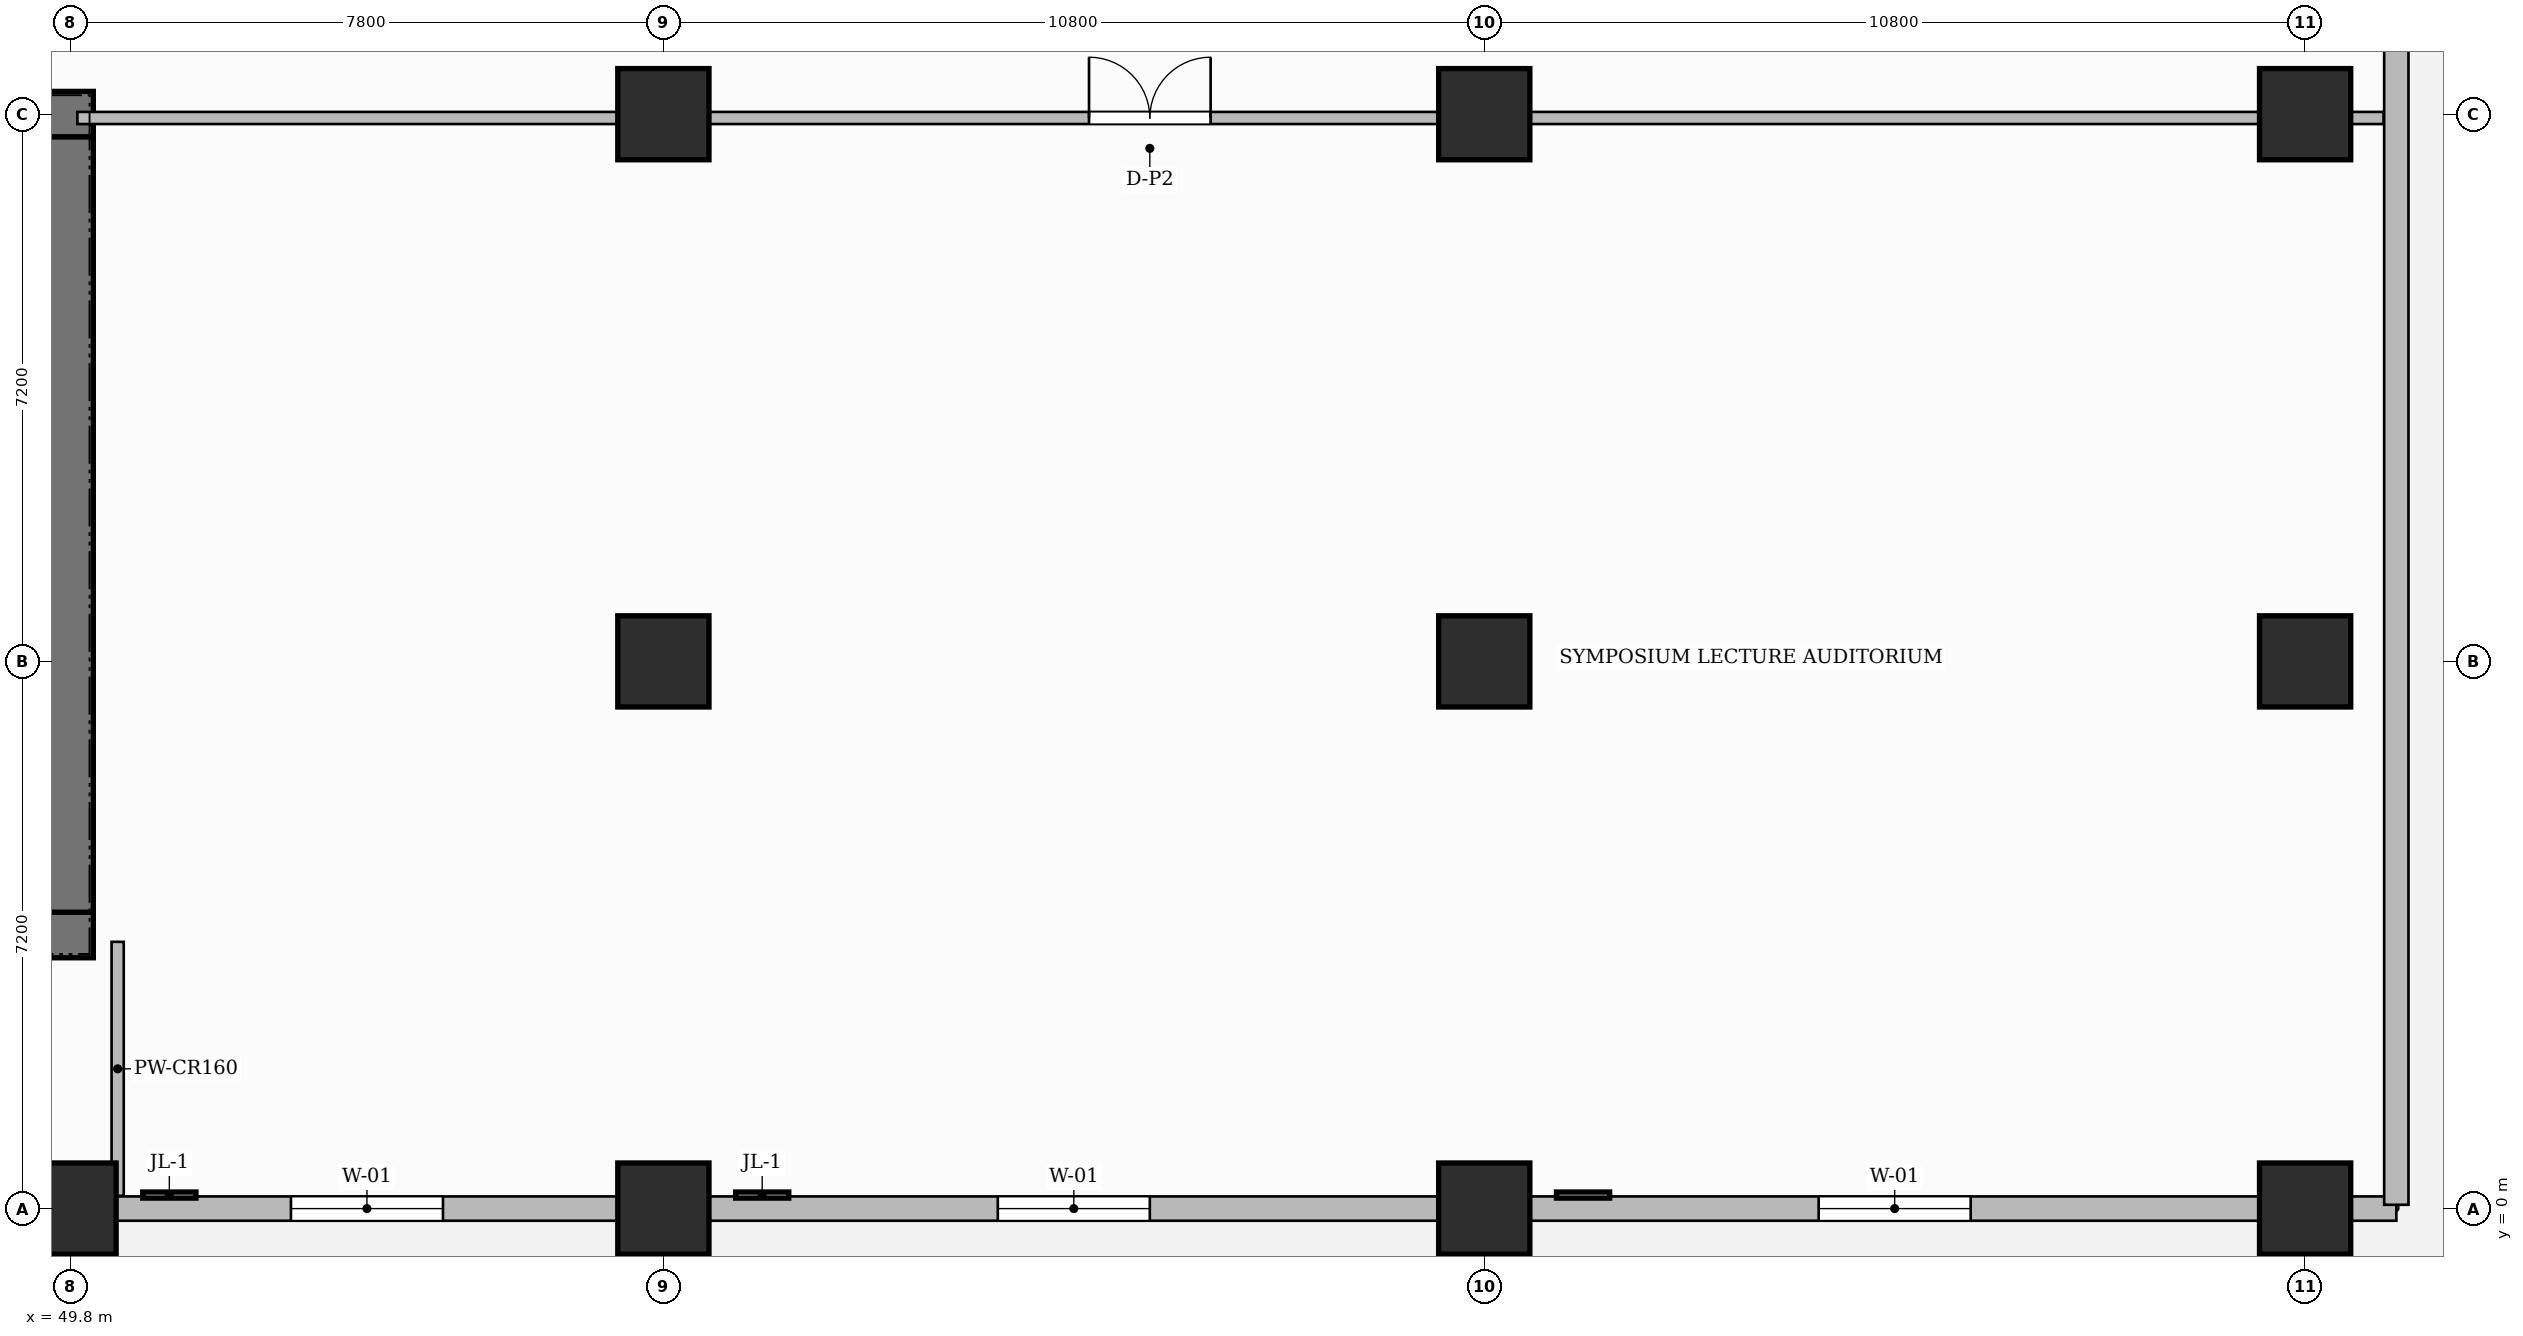
"""IFC4 building model, lengths in metres.
Left out: names, types, materials, properties, quantities, classifications, styles, units other than length and angle.
Written with IfcOpenShell. Run it as: python <this file> out.ifc"""

import sys

from ifc_helpers import new_model, si_unit, direction, frame, frame_2d, origin, origin_2d, place, context, subcontext, project, spatial, rectangle, extrude, source, transform, mapped, element, fill, save


model = new_model("IFC4")
c1 = context("Model", 3, precision=1e-05, world=origin(), true_north=direction((0.0, 1.0)))
c2 = subcontext(c1, "Body", "Model", "MODEL_VIEW")
j1 = project(units=[si_unit("LENGTHUNIT", "METRE"), si_unit("PLANEANGLEUNIT", "RADIAN")], contexts=[c1])
p1 = place(None, origin())
s1 = spatial("IfcSite", under=j1, at=p1, CompositionType="ELEMENT")
p2 = place(p1, origin())
s2 = spatial("IfcBuilding", under=s1, at=p2, CompositionType="ELEMENT")
p3 = place(p2, frame((0.0, 0.0, 16.2)))
s3 = spatial("IfcBuildingStorey", under=s2, at=p3, CompositionType="ELEMENT", Elevation=16.2)
p4 = place(p3, frame((34.5, 3.6, 0.0), z_axis=(0.0, 0.0, 1.0), x_axis=(1.0, 0.0, 0.0)))
e1 = element("IfcWall", 1, at=p4, inside=s3, PredefinedType="SHEAR", context=c2, shape_type="SweptSolid", body=[
    extrude(rectangle(XDim=15.6, YDim=0.6, at=frame_2d((7.8, 0.0))), origin(), (0.0, 0.0, 1.0), 5.4),
])
p5 = place(p4, frame((4.13, 0.0, 0.0)))
e2 = element("IfcOpeningElement", 2, at=p5, cuts=e1, PredefinedType="OPENING", context=c2, shape_type="SweptSolid", body=[
    extrude(rectangle(XDim=0.9, YDim=2.1, at=frame_2d((0.45, 1.05))), frame((0.0, 0.31, 0.0), z_axis=(0.0, -1.0, 0.0), x_axis=(1.0, 0.0, 0.0)), (0.0, 0.0, 1.0), 0.62),
])
p6 = place(p4, frame((5.7, 0.0, 0.0)))
e3 = element("IfcOpeningElement", 3, at=p6, cuts=e1, PredefinedType="OPENING", context=c2, shape_type="SweptSolid", body=[
    extrude(rectangle(XDim=0.9, YDim=2.1, at=frame_2d((0.45, 1.05))), frame((0.0, 0.31, 0.0), z_axis=(0.0, -1.0, 0.0), x_axis=(1.0, 0.0, 0.0)), (0.0, 0.0, 1.0), 0.62),
])
p7 = place(p4, frame((7.3, 0.0, 0.0)))
e4 = element("IfcOpeningElement", 4, at=p7, cuts=e1, PredefinedType="OPENING", context=c2, shape_type="SweptSolid", body=[
    extrude(rectangle(XDim=0.9, YDim=2.1, at=frame_2d((0.45, 1.05))), frame((0.0, 0.31, 0.0), z_axis=(0.0, -1.0, 0.0), x_axis=(1.0, 0.0, 0.0)), (0.0, 0.0, 1.0), 0.62),
])
p8 = place(p3, frame((34.5, 14.4, 0.0), z_axis=(0.0, 0.0, 1.0), x_axis=(1.0, 0.0, 0.0)))
e5 = element("IfcWall", 5, at=p8, inside=s3, PredefinedType="SHEAR", context=c2, shape_type="SweptSolid", body=[
    extrude(rectangle(XDim=15.6, YDim=0.6, at=frame_2d((7.8, 0.0))), origin(), (0.0, 0.0, 1.0), 5.4),
])
p9 = place(p8, frame((5.43, 0.0, 0.0)))
e6 = element("IfcOpeningElement", 6, at=p9, cuts=e5, PredefinedType="OPENING", context=c2, shape_type="SweptSolid", body=[
    extrude(rectangle(XDim=1.5, YDim=2.2, at=frame_2d((0.75, 1.1))), frame((0.0, 0.31, 0.0), z_axis=(0.0, -1.0, 0.0), x_axis=(1.0, 0.0, 0.0)), (0.0, 0.0, 1.0), 0.62),
])
p10 = place(p8, frame((1.645, 0.0, 0.0)))
e7 = element("IfcOpeningElement", 7, at=p10, cuts=e5, PredefinedType="OPENING", context=c2, shape_type="SweptSolid", body=[
    extrude(rectangle(XDim=1.05, YDim=2.15, at=frame_2d((0.525, 1.075))), frame((0.0, 0.31, 0.0), z_axis=(0.0, -1.0, 0.0), x_axis=(1.0, 0.0, 0.0)), (0.0, 0.0, 1.0), 0.62),
])
p11 = place(p8, frame((11.275, 0.0, 0.0)))
e8 = element("IfcOpeningElement", 8, at=p11, cuts=e5, PredefinedType="OPENING", context=c2, shape_type="SweptSolid", body=[
    extrude(rectangle(XDim=1.05, YDim=2.15, at=frame_2d((0.525, 1.075))), frame((0.0, 0.31, 0.0), z_axis=(0.0, -1.0, 0.0), x_axis=(1.0, 0.0, 0.0)), (0.0, 0.0, 1.0), 0.62),
])
p12 = place(p3, frame((49.8, 3.9, 0.0), z_axis=(0.0, 0.0, 1.0), x_axis=(0.0, 1.0, 0.0)))
e9 = element("IfcWall", 9, at=p12, inside=s3, PredefinedType="SHEAR", context=c2, shape_type="SweptSolid", body=[
    extrude(rectangle(XDim=10.2, YDim=0.6, at=frame_2d((5.1, 0.0))), origin(), (0.0, 0.0, 1.0), 5.4),
])
m1 = source(origin(), c2, "Body", "SweptSolid", [
    extrude(rectangle(XDim=1.2, YDim=1.2, at=origin_2d()), origin(), (0.0, 0.0, 1.0), 5.4),
])
for number, where, z_axis, x_axis in (
    (10, (49.8, 0.0, 0.0), (0.0, 0.0, 1.0), (1.0, 0.0, 0.0)),
    (11, (57.6, 0.0, 0.0), (0.0, 0.0, 1.0), (1.0, 0.0, 0.0)),
    (12, (57.6, 7.2, 0.0), (0.0, 0.0, 1.0), (1.0, 0.0, 0.0)),
    (13, (57.6, 14.4, 0.0), (0.0, 0.0, 1.0), (1.0, 0.0, 0.0)),
    (14, (68.4, 0.0, 0.0), (0.0, 0.0, 1.0), (1.0, 0.0, 0.0)),
    (15, (68.4, 7.2, 0.0), (0.0, 0.0, 1.0), (1.0, 0.0, 0.0)),
    (16, (68.4, 14.4, 0.0), (0.0, 0.0, 1.0), (1.0, 0.0, 0.0)),
    (17, (79.2, 0.0, 0.0), (0.0, 0.0, 1.0), (1.0, 0.0, 0.0)),
    (18, (79.2, 7.2, 0.0), (0.0, 0.0, 1.0), (1.0, 0.0, 0.0)),
    (19, (79.2, 14.4, 0.0), (0.0, 0.0, 1.0), (1.0, 0.0, 0.0)),
):
    element("IfcColumn", number, at=place(p3, frame(where, z_axis=z_axis, x_axis=x_axis)), inside=s3, PredefinedType="COLUMN", context=c2, shape_type="MappedRepresentation", body=[
        mapped(m1, transform((0.0, 0.0, 0.0), scale=1.0)),
    ])
p13 = place(p3, frame((49.89, 14.35, 0.0), z_axis=(0.0, 0.0, 1.0), x_axis=(1.0, 0.0, 0.0)))
e20 = element("IfcWall", 20, at=p13, inside=s3, PredefinedType="PARTITIONING", context=c2, shape_type="SweptSolid", body=[
    extrude(rectangle(XDim=30.342, YDim=0.16, at=frame_2d((15.171, 0.0))), origin(), (0.0, 0.0, 1.0), 4.185),
])
p14 = place(p13, frame((13.31, 0.0, 0.0)))
e21 = element("IfcOpeningElement", 21, at=p14, cuts=e20, PredefinedType="OPENING", context=c2, shape_type="SweptSolid", body=[
    extrude(rectangle(XDim=1.6, YDim=2.4, at=frame_2d((0.8, 1.2))), frame((0.0, 0.09, 0.0), z_axis=(0.0, -1.0, 0.0), x_axis=(1.0, 0.0, 0.0)), (0.0, 0.0, 1.0), 0.18),
])
p15 = place(p3, frame((50.42, 0.168, 0.0), z_axis=(0.0, 0.0, 1.0), x_axis=(0.0, 1.0, 0.0)))
e22 = element("IfcWall", 22, at=p15, inside=s3, PredefinedType="PARTITIONING", context=c2, shape_type="SweptSolid", body=[
    extrude(rectangle(XDim=3.342, YDim=0.16, at=frame_2d((1.671, 0.0))), origin(), (0.0, 0.0, 1.0), 5.1),
])
p16 = place(p3, frame((-4.8, 0.0, 0.0), z_axis=(0.0, 0.0, 1.0), x_axis=(1.0, 0.0, 0.0)))
e23 = element("IfcWall", 23, at=p16, inside=s3, PredefinedType="SOLIDWALL", context=c2, shape_type="SweptSolid", body=[
    extrude(rectangle(XDim=85.2, YDim=0.32, at=frame_2d((42.6, 0.0))), origin(), (0.0, 0.0, 1.0), 4.185),
])
p17 = place(p16, frame((1.4, 0.0, 0.75)))
e24 = element("IfcOpeningElement", 24, at=p17, cuts=e23, PredefinedType="OPENING", context=c2, shape_type="SweptSolid", body=[
    extrude(rectangle(XDim=2.0, YDim=2.6, at=frame_2d((1.0, 1.3))), frame((0.0, 0.17, 0.0), z_axis=(0.0, -1.0, 0.0), x_axis=(1.0, 0.0, 0.0)), (0.0, 0.0, 1.0), 0.34),
])
p18 = place(p16, frame((7.4, 0.0, 0.75)))
e25 = element("IfcOpeningElement", 25, at=p18, cuts=e23, PredefinedType="OPENING", context=c2, shape_type="SweptSolid", body=[
    extrude(rectangle(XDim=2.0, YDim=2.6, at=frame_2d((1.0, 1.3))), frame((0.0, 0.17, 0.0), z_axis=(0.0, -1.0, 0.0), x_axis=(1.0, 0.0, 0.0)), (0.0, 0.0, 1.0), 0.34),
])
p19 = place(p16, frame((14.6, 0.0, 0.75)))
e26 = element("IfcOpeningElement", 26, at=p19, cuts=e23, PredefinedType="OPENING", context=c2, shape_type="SweptSolid", body=[
    extrude(rectangle(XDim=2.0, YDim=2.6, at=frame_2d((1.0, 1.3))), frame((0.0, 0.17, 0.0), z_axis=(0.0, -1.0, 0.0), x_axis=(1.0, 0.0, 0.0)), (0.0, 0.0, 1.0), 0.34),
])
p20 = place(p16, frame((21.8, 0.0, 0.75)))
e27 = element("IfcOpeningElement", 27, at=p20, cuts=e23, PredefinedType="OPENING", context=c2, shape_type="SweptSolid", body=[
    extrude(rectangle(XDim=2.0, YDim=2.6, at=frame_2d((1.0, 1.3))), frame((0.0, 0.17, 0.0), z_axis=(0.0, -1.0, 0.0), x_axis=(1.0, 0.0, 0.0)), (0.0, 0.0, 1.0), 0.34),
])
p21 = place(p16, frame((29.0, 0.0, 0.75)))
e28 = element("IfcOpeningElement", 28, at=p21, cuts=e23, PredefinedType="OPENING", context=c2, shape_type="SweptSolid", body=[
    extrude(rectangle(XDim=2.0, YDim=2.6, at=frame_2d((1.0, 1.3))), frame((0.0, 0.17, 0.0), z_axis=(0.0, -1.0, 0.0), x_axis=(1.0, 0.0, 0.0)), (0.0, 0.0, 1.0), 0.34),
])
p22 = place(p16, frame((35.6, 0.0, 0.75)))
e29 = element("IfcOpeningElement", 29, at=p22, cuts=e23, PredefinedType="OPENING", context=c2, shape_type="SweptSolid", body=[
    extrude(rectangle(XDim=2.0, YDim=2.6, at=frame_2d((1.0, 1.3))), frame((0.0, 0.17, 0.0), z_axis=(0.0, -1.0, 0.0), x_axis=(1.0, 0.0, 0.0)), (0.0, 0.0, 1.0), 0.34),
])
p23 = place(p16, frame((42.2, 0.0, 0.75)))
e30 = element("IfcOpeningElement", 30, at=p23, cuts=e23, PredefinedType="OPENING", context=c2, shape_type="SweptSolid", body=[
    extrude(rectangle(XDim=2.0, YDim=2.6, at=frame_2d((1.0, 1.3))), frame((0.0, 0.17, 0.0), z_axis=(0.0, -1.0, 0.0), x_axis=(1.0, 0.0, 0.0)), (0.0, 0.0, 1.0), 0.34),
])
p24 = place(p16, frame((49.7, 0.0, 0.75)))
e31 = element("IfcOpeningElement", 31, at=p24, cuts=e23, PredefinedType="OPENING", context=c2, shape_type="SweptSolid", body=[
    extrude(rectangle(XDim=2.0, YDim=2.6, at=frame_2d((1.0, 1.3))), frame((0.0, 0.17, 0.0), z_axis=(0.0, -1.0, 0.0), x_axis=(1.0, 0.0, 0.0)), (0.0, 0.0, 1.0), 0.34),
])
p25 = place(p16, frame((57.5, 0.0, 0.75)))
e32 = element("IfcOpeningElement", 32, at=p25, cuts=e23, PredefinedType="OPENING", context=c2, shape_type="SweptSolid", body=[
    extrude(rectangle(XDim=2.0, YDim=2.6, at=frame_2d((1.0, 1.3))), frame((0.0, 0.17, 0.0), z_axis=(0.0, -1.0, 0.0), x_axis=(1.0, 0.0, 0.0)), (0.0, 0.0, 1.0), 0.34),
])
p26 = place(p16, frame((66.8, 0.0, 0.75)))
e33 = element("IfcOpeningElement", 33, at=p26, cuts=e23, PredefinedType="OPENING", context=c2, shape_type="SweptSolid", body=[
    extrude(rectangle(XDim=2.0, YDim=2.6, at=frame_2d((1.0, 1.3))), frame((0.0, 0.17, 0.0), z_axis=(0.0, -1.0, 0.0), x_axis=(1.0, 0.0, 0.0)), (0.0, 0.0, 1.0), 0.34),
])
p27 = place(p16, frame((77.6, 0.0, 0.75)))
e34 = element("IfcOpeningElement", 34, at=p27, cuts=e23, PredefinedType="OPENING", context=c2, shape_type="SweptSolid", body=[
    extrude(rectangle(XDim=2.0, YDim=2.6, at=frame_2d((1.0, 1.3))), frame((0.0, 0.17, 0.0), z_axis=(0.0, -1.0, 0.0), x_axis=(1.0, 0.0, 0.0)), (0.0, 0.0, 1.0), 0.34),
])
p28 = place(p3, frame((80.4, 0.05, 0.0), z_axis=(0.0, 0.0, 1.0), x_axis=(0.0, 1.0, 0.0)))
e35 = element("IfcWall", 35, at=p28, inside=s3, PredefinedType="SOLIDWALL", context=c2, shape_type="SweptSolid", body=[
    extrude(rectangle(XDim=46.7, YDim=0.32, at=frame_2d((23.35, 0.0))), origin(), (0.0, 0.0, 1.0), 5.1),
])
p29 = place(p28, frame((22.35, 0.0, 0.75)))
e36 = element("IfcOpeningElement", 36, at=p29, cuts=e35, PredefinedType="OPENING", context=c2, shape_type="SweptSolid", body=[
    extrude(rectangle(XDim=2.0, YDim=2.6, at=frame_2d((1.0, 1.3))), frame((0.0, 0.17, 0.0), z_axis=(0.0, -1.0, 0.0), x_axis=(1.0, 0.0, 0.0)), (0.0, 0.0, 1.0), 0.34),
])
m2 = source(origin(), c2, "Body", "SweptSolid", [
    extrude(rectangle(XDim=1.6, YDim=2.4, at=frame_2d((0.8, 1.2))), frame((0.0, 0.025, 0.0), z_axis=(0.0, -1.0, 0.0), x_axis=(1.0, 0.0, 0.0)), (0.0, 0.0, 1.0), 0.05),
])
p30 = place(p14, origin())
e37 = element("IfcDoor", 37, at=p30, inside=s3, OperationType="DOUBLE_DOOR_SINGLE_SWING", PredefinedType="DOOR", context=c2, shape_type="MappedRepresentation", body=[
    mapped(m2, transform((0.0, 0.0, 0.0), scale=1.0)),
])
fill(e21, e37)
m3 = source(origin(), c2, "Body", "SweptSolid", [
    extrude(rectangle(XDim=2.0, YDim=2.6, at=frame_2d((1.0, 1.3))), frame((0.0, 0.03, 0.0), z_axis=(0.0, -1.0, 0.0), x_axis=(1.0, 0.0, 0.0)), (0.0, 0.0, 1.0), 0.06),
])
p31 = place(p25, origin())
e38 = element("IfcWindow", 38, at=p31, inside=s3, PartitioningType="DOUBLE_PANEL_VERTICAL", PredefinedType="WINDOW", context=c2, shape_type="MappedRepresentation", body=[
    mapped(m3, transform((0.0, 0.0, 0.0), scale=1.0)),
])
fill(e32, e38)
p32 = place(p26, origin())
e39 = element("IfcWindow", 39, at=p32, inside=s3, PartitioningType="DOUBLE_PANEL_VERTICAL", PredefinedType="WINDOW", context=c2, shape_type="MappedRepresentation", body=[
    mapped(m3, transform((0.0, 0.0, 0.0), scale=1.0)),
])
fill(e33, e39)
p33 = place(p27, origin())
e40 = element("IfcWindow", 40, at=p33, inside=s3, PartitioningType="DOUBLE_PANEL_VERTICAL", PredefinedType="WINDOW", context=c2, shape_type="MappedRepresentation", body=[
    mapped(m3, transform((0.0, 0.0, 0.0), scale=1.0)),
])
fill(e34, e40)
save(model, sys.argv[1])
